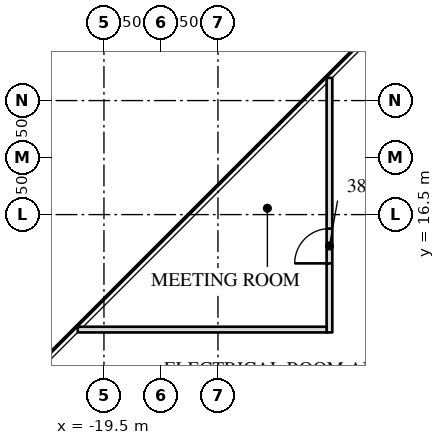
"""IFC4 building model, lengths in metres.
Left out: names, types, materials, properties, quantities, classifications, styles, units other than length and angle.
Written with IfcOpenShell. Run it as: python <this file> out.ifc"""

import sys

from ifc_helpers import new_model, si_unit, direction, frame, frame_2d, origin, place, context, subcontext, project, spatial, rectangle, extrude, element, fill, save


model = new_model("IFC4")
c1 = context("Model", 3, precision=1e-05, world=origin(), true_north=direction((0.0, 1.0)))
c2 = subcontext(c1, "Body", "Model", "MODEL_VIEW")
j1 = project(units=[si_unit("LENGTHUNIT", "METRE"), si_unit("PLANEANGLEUNIT", "RADIAN")], contexts=[c1])
p1 = place(None, origin())
s1 = spatial("IfcSite", under=j1, at=p1, CompositionType="ELEMENT")
p2 = place(p1, origin())
s2 = spatial("IfcBuilding", under=s1, at=p2, CompositionType="ELEMENT")
p3 = place(p2, frame((0.0, 0.0, 162.3)))
s3 = spatial("IfcBuildingStorey", under=s2, at=p3, CompositionType="ELEMENT", Elevation=162.3)
p4 = place(p3, frame((-13.566, 13.399, 0.0), z_axis=(0.0, 0.0, 1.0), x_axis=(0.0, 1.0, 0.0)))
e1 = element("IfcWall", 1, at=p4, inside=s3, PredefinedType="PARTITIONING", context=c2, shape_type="SweptSolid", body=[
    extrude(rectangle(XDim=6.698, YDim=0.15, at=frame_2d((3.349, 0.0))), origin(), (0.0, 0.0, 1.0), 3.91),
])
p5 = place(p4, frame((1.817, 0.0, 0.0)))
e2 = element("IfcOpeningElement", 2, at=p5, cuts=e1, PredefinedType="OPENING", context=c2, shape_type="SweptSolid", body=[
    extrude(rectangle(XDim=0.915, YDim=2.134, at=frame_2d((0.458, 1.067))), frame((0.0, 0.085, 0.0), z_axis=(0.0, -1.0, 0.0), x_axis=(1.0, 0.0, 0.0)), (0.0, 0.0, 1.0), 0.17),
])
p6 = place(p3, frame((-13.641, 13.474, 0.0), z_axis=(0.0, 0.0, 1.0), x_axis=(-1.0, 0.0, 0.0)))
e3 = element("IfcWall", 3, at=p6, inside=s3, PredefinedType="PARTITIONING", context=c2, shape_type="SweptSolid", body=[
    extrude(rectangle(XDim=6.548, YDim=0.15, at=frame_2d((3.274, 0.0))), origin(), (0.0, 0.0, 1.0), 3.91),
])
p7 = place(p5, origin())
e4 = element("IfcDoor", 4, at=p7, inside=s3, OperationType="SINGLE_SWING_LEFT", PredefinedType="DOOR", context=c2, shape_type="SweptSolid", body=[
    extrude(rectangle(XDim=0.915, YDim=2.134, at=frame_2d((0.458, 1.067))), frame((0.0, 0.025, 0.0), z_axis=(0.0, -1.0, 0.0), x_axis=(1.0, 0.0, 0.0)), (0.0, 0.0, 1.0), 0.05),
])
fill(e2, e4)
save(model, sys.argv[1])
